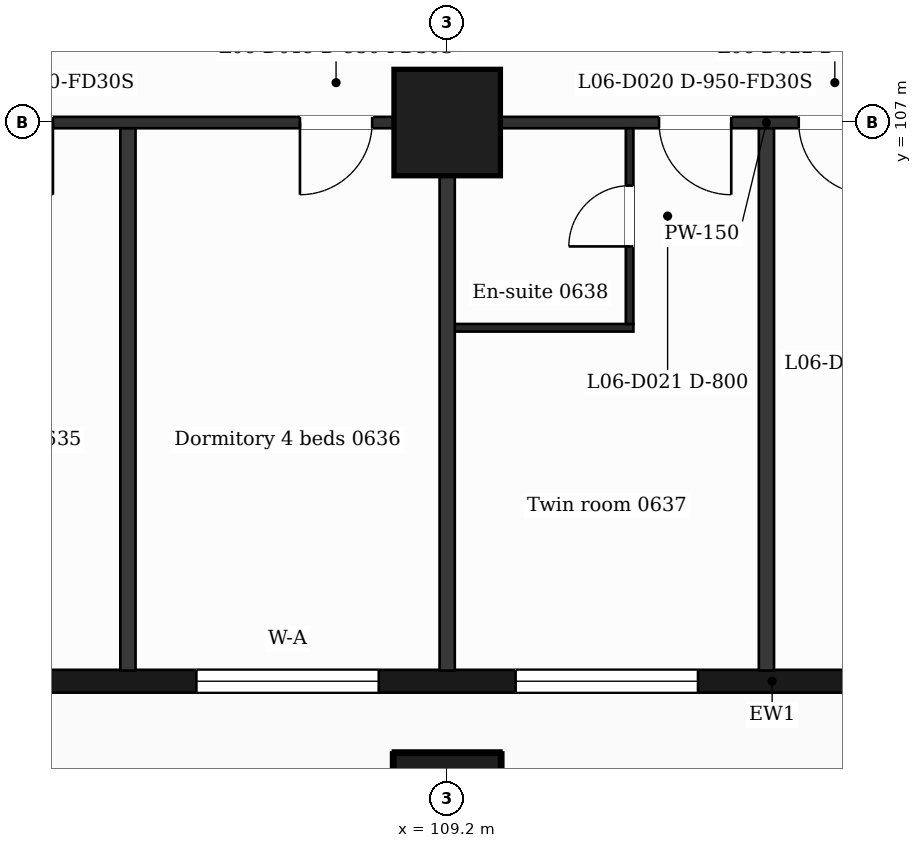
"""IFC4 building model, lengths in metres.
Left out: names, types, materials, properties, quantities, classifications, styles, units other than length and angle.
Written with IfcOpenShell. Run it as: python <this file> out.ifc"""

import sys

from ifc_helpers import new_model, si_unit, direction, frame, frame_2d, origin, origin_2d, place, context, subcontext, project, spatial, rectangle, extrude, element, fill, save


model = new_model("IFC4")
c1 = context("Model", 3, precision=1e-05, world=origin(), true_north=direction((0.0, 1.0)))
c2 = subcontext(c1, "Body", "Model", "MODEL_VIEW")
j1 = project(units=[si_unit("LENGTHUNIT", "METRE"), si_unit("PLANEANGLEUNIT", "RADIAN")], contexts=[c1])
p1 = place(None, origin())
s1 = spatial("IfcSite", under=j1, at=p1, CompositionType="ELEMENT")
p2 = place(p1, origin())
s2 = spatial("IfcBuilding", under=s1, at=p2, CompositionType="ELEMENT")
p3 = place(p2, frame((0.0, 0.0, 39.0)))
s3 = spatial("IfcBuildingStorey", under=s2, at=p3, CompositionType="ELEMENT", Elevation=39.0)
for number, where, z_axis, x_axis in (
    (1, (109.2, 98.0, -0.32), (0.0, 0.0, 1.0), (1.0, 0.0, 0.0)),
    (2, (109.2, 107.0, -0.32), (0.0, 0.0, 1.0), (1.0, 0.0, 0.0)),
):
    element("IfcColumn", number, at=place(p3, frame(where, z_axis=z_axis, x_axis=x_axis)), inside=s3, PredefinedType="COLUMN", context=c2, shape_type="SweptSolid", body=[
        extrude(rectangle(XDim=1.4, YDim=1.4, at=origin_2d()), origin(), (0.0, 0.0, 1.0), 3.82),
    ])
p4 = place(p3, frame((89.85, 99.65, 0.0), z_axis=(0.0, 0.0, 1.0), x_axis=(1.0, 0.0, 0.0)))
e3 = element("IfcWall", 3, at=p4, inside=s3, PredefinedType="SOLIDWALL", context=c2, shape_type="SweptSolid", body=[
    extrude(rectangle(XDim=47.25, YDim=0.3, at=frame_2d((23.625, 0.0))), origin(), (0.0, 0.0, 1.0), 3.18),
])
p5 = place(p4, frame((0.725, 0.0, 0.9)))
e4 = element("IfcOpeningElement", 4, at=p5, cuts=e3, PredefinedType="OPENING", context=c2, shape_type="SweptSolid", body=[
    extrude(rectangle(XDim=1.2, YDim=2.1, at=frame_2d((0.6, 1.05))), frame((0.0, 0.16, 0.0), z_axis=(0.0, -1.0, 0.0), x_axis=(1.0, 0.0, 0.0)), (0.0, 0.0, 1.0), 0.32),
])
p6 = place(p4, frame((3.45, 0.0, 0.9)))
e5 = element("IfcOpeningElement", 5, at=p6, cuts=e3, PredefinedType="OPENING", context=c2, shape_type="SweptSolid", body=[
    extrude(rectangle(XDim=2.4, YDim=2.1, at=frame_2d((1.2, 1.05))), frame((0.0, 0.16, 0.0), z_axis=(0.0, -1.0, 0.0), x_axis=(1.0, 0.0, 0.0)), (0.0, 0.0, 1.0), 0.32),
])
p7 = place(p4, frame((8.25, 0.0, 0.9)))
e6 = element("IfcOpeningElement", 6, at=p7, cuts=e3, PredefinedType="OPENING", context=c2, shape_type="SweptSolid", body=[
    extrude(rectangle(XDim=1.2, YDim=2.1, at=frame_2d((0.6, 1.05))), frame((0.0, 0.16, 0.0), z_axis=(0.0, -1.0, 0.0), x_axis=(1.0, 0.0, 0.0)), (0.0, 0.0, 1.0), 0.32),
])
p8 = place(p4, frame((12.45, 0.0, 0.9)))
e7 = element("IfcOpeningElement", 7, at=p8, cuts=e3, PredefinedType="OPENING", context=c2, shape_type="SweptSolid", body=[
    extrude(rectangle(XDim=1.2, YDim=2.1, at=frame_2d((0.6, 1.05))), frame((0.0, 0.16, 0.0), z_axis=(0.0, -1.0, 0.0), x_axis=(1.0, 0.0, 0.0)), (0.0, 0.0, 1.0), 0.32),
])
p9 = place(p4, frame((16.05, 0.0, 0.9)))
e8 = element("IfcOpeningElement", 8, at=p9, cuts=e3, PredefinedType="OPENING", context=c2, shape_type="SweptSolid", body=[
    extrude(rectangle(XDim=2.4, YDim=2.1, at=frame_2d((1.2, 1.05))), frame((0.0, 0.16, 0.0), z_axis=(0.0, -1.0, 0.0), x_axis=(1.0, 0.0, 0.0)), (0.0, 0.0, 1.0), 0.32),
])
p10 = place(p4, frame((20.25, 0.0, 0.9)))
e9 = element("IfcOpeningElement", 9, at=p10, cuts=e3, PredefinedType="OPENING", context=c2, shape_type="SweptSolid", body=[
    extrude(rectangle(XDim=2.4, YDim=2.1, at=frame_2d((1.2, 1.05))), frame((0.0, 0.16, 0.0), z_axis=(0.0, -1.0, 0.0), x_axis=(1.0, 0.0, 0.0)), (0.0, 0.0, 1.0), 0.32),
])
p11 = place(p4, frame((25.05, 0.0, 0.0)))
e10 = element("IfcOpeningElement", 10, at=p11, cuts=e3, PredefinedType="OPENING", context=c2, shape_type="SweptSolid", body=[
    extrude(rectangle(XDim=1.2, YDim=2.4, at=frame_2d((0.6, 1.2))), frame((0.0, 0.16, 0.0), z_axis=(0.0, -1.0, 0.0), x_axis=(1.0, 0.0, 0.0)), (0.0, 0.0, 1.0), 0.32),
])
p12 = place(p4, frame((28.65, 0.0, 0.9)))
e11 = element("IfcOpeningElement", 11, at=p12, cuts=e3, PredefinedType="OPENING", context=c2, shape_type="SweptSolid", body=[
    extrude(rectangle(XDim=2.4, YDim=2.1, at=frame_2d((1.2, 1.05))), frame((0.0, 0.16, 0.0), z_axis=(0.0, -1.0, 0.0), x_axis=(1.0, 0.0, 0.0)), (0.0, 0.0, 1.0), 0.32),
])
p13 = place(p4, frame((32.85, 0.0, 0.9)))
e12 = element("IfcOpeningElement", 12, at=p13, cuts=e3, PredefinedType="OPENING", context=c2, shape_type="SweptSolid", body=[
    extrude(rectangle(XDim=2.4, YDim=2.1, at=frame_2d((1.2, 1.05))), frame((0.0, 0.16, 0.0), z_axis=(0.0, -1.0, 0.0), x_axis=(1.0, 0.0, 0.0)), (0.0, 0.0, 1.0), 0.32),
])
p14 = place(p4, frame((37.65, 0.0, 0.9)))
e13 = element("IfcOpeningElement", 13, at=p14, cuts=e3, PredefinedType="OPENING", context=c2, shape_type="SweptSolid", body=[
    extrude(rectangle(XDim=1.2, YDim=2.1, at=frame_2d((0.6, 1.05))), frame((0.0, 0.16, 0.0), z_axis=(0.0, -1.0, 0.0), x_axis=(1.0, 0.0, 0.0)), (0.0, 0.0, 1.0), 0.32),
])
p15 = place(p4, frame((41.85, 0.0, 0.9)))
e14 = element("IfcOpeningElement", 14, at=p15, cuts=e3, PredefinedType="OPENING", context=c2, shape_type="SweptSolid", body=[
    extrude(rectangle(XDim=1.2, YDim=2.1, at=frame_2d((0.6, 1.05))), frame((0.0, 0.16, 0.0), z_axis=(0.0, -1.0, 0.0), x_axis=(1.0, 0.0, 0.0)), (0.0, 0.0, 1.0), 0.32),
])
p16 = place(p4, frame((45.25, 0.0, 0.9)))
e15 = element("IfcOpeningElement", 15, at=p16, cuts=e3, PredefinedType="OPENING", context=c2, shape_type="SweptSolid", body=[
    extrude(rectangle(XDim=1.2, YDim=2.1, at=frame_2d((0.6, 1.05))), frame((0.0, 0.16, 0.0), z_axis=(0.0, -1.0, 0.0), x_axis=(1.0, 0.0, 0.0)), (0.0, 0.0, 1.0), 0.32),
])
p17 = place(p3, frame((109.2, 104.3, 0.0), z_axis=(0.0, 0.0, 1.0), x_axis=(1.0, 0.0, 0.0)))
e16 = element("IfcWall", 16, at=p17, inside=s3, PredefinedType="PARTITIONING", context=c2, shape_type="SweptSolid", body=[
    extrude(rectangle(XDim=2.45, YDim=0.1, at=frame_2d((1.225, 0.0))), origin(), (0.0, 0.0, 1.0), 3.18),
])
p18 = place(p3, frame((87.018, 107.0, 0.0), z_axis=(0.0, 0.0, 1.0), x_axis=(1.0, 0.0, 0.0)))
e17 = element("IfcWall", 17, at=p18, inside=s3, PredefinedType="PARTITIONING", context=c2, shape_type="SweptSolid", body=[
    extrude(rectangle(XDim=52.765, YDim=0.15, at=frame_2d((26.382, 0.0))), origin(), (0.0, 0.0, 1.0), 3.18),
])
p19 = place(p18, frame((1.032, 0.0, 0.0)))
e18 = element("IfcOpeningElement", 18, at=p19, cuts=e17, PredefinedType="OPENING", context=c2, shape_type="SweptSolid", body=[
    extrude(rectangle(XDim=0.95, YDim=2.1, at=frame_2d((0.475, 1.05))), frame((0.0, 0.085, 0.0), z_axis=(0.0, -1.0, 0.0), x_axis=(1.0, 0.0, 0.0)), (0.0, 0.0, 1.0), 0.17),
])
p20 = place(p18, frame((6.369, 0.0, 0.0)))
e19 = element("IfcOpeningElement", 19, at=p20, cuts=e17, PredefinedType="OPENING", context=c2, shape_type="SweptSolid", body=[
    extrude(rectangle(XDim=0.95, YDim=2.1, at=frame_2d((0.475, 1.05))), frame((0.0, 0.085, 0.0), z_axis=(0.0, -1.0, 0.0), x_axis=(1.0, 0.0, 0.0)), (0.0, 0.0, 1.0), 0.17),
])
p21 = place(p18, frame((10.952, 0.0, 0.0)))
e20 = element("IfcOpeningElement", 20, at=p21, cuts=e17, PredefinedType="OPENING", context=c2, shape_type="SweptSolid", body=[
    extrude(rectangle(XDim=0.95, YDim=2.1, at=frame_2d((0.475, 1.05))), frame((0.0, 0.085, 0.0), z_axis=(0.0, -1.0, 0.0), x_axis=(1.0, 0.0, 0.0)), (0.0, 0.0, 1.0), 0.17),
])
p22 = place(p18, frame((16.045, 0.0, 0.0)))
e21 = element("IfcOpeningElement", 21, at=p22, cuts=e17, PredefinedType="OPENING", context=c2, shape_type="SweptSolid", body=[
    extrude(rectangle(XDim=0.95, YDim=2.1, at=frame_2d((0.475, 1.05))), frame((0.0, 0.085, 0.0), z_axis=(0.0, -1.0, 0.0), x_axis=(1.0, 0.0, 0.0)), (0.0, 0.0, 1.0), 0.17),
])
p23 = place(p18, frame((20.245, 0.0, 0.0)))
e22 = element("IfcOpeningElement", 22, at=p23, cuts=e17, PredefinedType="OPENING", context=c2, shape_type="SweptSolid", body=[
    extrude(rectangle(XDim=0.95, YDim=2.1, at=frame_2d((0.475, 1.05))), frame((0.0, 0.085, 0.0), z_axis=(0.0, -1.0, 0.0), x_axis=(1.0, 0.0, 0.0)), (0.0, 0.0, 1.0), 0.17),
])
p24 = place(p18, frame((24.969, 0.0, 0.0)))
e23 = element("IfcOpeningElement", 23, at=p24, cuts=e17, PredefinedType="OPENING", context=c2, shape_type="SweptSolid", body=[
    extrude(rectangle(XDim=0.95, YDim=2.1, at=frame_2d((0.475, 1.05))), frame((0.0, 0.085, 0.0), z_axis=(0.0, -1.0, 0.0), x_axis=(1.0, 0.0, 0.0)), (0.0, 0.0, 1.0), 0.17),
])
p25 = place(p18, frame((26.807, 0.0, 0.0)))
e24 = element("IfcOpeningElement", 24, at=p25, cuts=e17, PredefinedType="OPENING", context=c2, shape_type="SweptSolid", body=[
    extrude(rectangle(XDim=0.95, YDim=2.1, at=frame_2d((0.475, 1.05))), frame((0.0, 0.085, 0.0), z_axis=(0.0, -1.0, 0.0), x_axis=(1.0, 0.0, 0.0)), (0.0, 0.0, 1.0), 0.17),
])
p26 = place(p18, frame((31.952, 0.0, 0.0)))
e25 = element("IfcOpeningElement", 25, at=p26, cuts=e17, PredefinedType="OPENING", context=c2, shape_type="SweptSolid", body=[
    extrude(rectangle(XDim=0.95, YDim=2.1, at=frame_2d((0.475, 1.05))), frame((0.0, 0.085, 0.0), z_axis=(0.0, -1.0, 0.0), x_axis=(1.0, 0.0, 0.0)), (0.0, 0.0, 1.0), 0.17),
])
p27 = place(p18, frame((40.795, 0.0, 0.0)))
e26 = element("IfcOpeningElement", 26, at=p27, cuts=e17, PredefinedType="OPENING", context=c2, shape_type="SweptSolid", body=[
    extrude(rectangle(XDim=0.95, YDim=2.1, at=frame_2d((0.475, 1.05))), frame((0.0, 0.085, 0.0), z_axis=(0.0, -1.0, 0.0), x_axis=(1.0, 0.0, 0.0)), (0.0, 0.0, 1.0), 0.17),
])
p28 = place(p18, frame((43.644, 0.0, 0.0)))
e27 = element("IfcOpeningElement", 27, at=p28, cuts=e17, PredefinedType="OPENING", context=c2, shape_type="SweptSolid", body=[
    extrude(rectangle(XDim=0.95, YDim=2.1, at=frame_2d((0.475, 1.05))), frame((0.0, 0.085, 0.0), z_axis=(0.0, -1.0, 0.0), x_axis=(1.0, 0.0, 0.0)), (0.0, 0.0, 1.0), 0.17),
])
p29 = place(p18, frame((48.767, 0.0, 0.0)))
e28 = element("IfcOpeningElement", 28, at=p29, cuts=e17, PredefinedType="OPENING", context=c2, shape_type="SweptSolid", body=[
    extrude(rectangle(XDim=0.95, YDim=2.1, at=frame_2d((0.475, 1.05))), frame((0.0, 0.085, 0.0), z_axis=(0.0, -1.0, 0.0), x_axis=(1.0, 0.0, 0.0)), (0.0, 0.0, 1.0), 0.17),
])
for number, where, z_axis, x_axis in (
    (29, (105.0, 99.79, 0.0), (0.0, 0.0, 1.0), (0.0, 1.0, 0.0)),
    (30, (109.2, 99.79, 0.0), (0.0, 0.0, 1.0), (0.0, 1.0, 0.0)),
):
    element("IfcWall", number, at=place(p3, frame(where, z_axis=z_axis, x_axis=x_axis)), inside=s3, PredefinedType="PARTITIONING", context=c2, shape_type="SweptSolid", body=[
        extrude(rectangle(XDim=7.135, YDim=0.2, at=frame_2d((3.567, 0.0))), origin(), (0.0, 0.0, 1.0), 3.18),
    ])
p30 = place(p3, frame((111.6, 104.35, 0.0), z_axis=(0.0, 0.0, 1.0), x_axis=(0.0, 1.0, 0.0)))
e31 = element("IfcWall", 31, at=p30, inside=s3, PredefinedType="PARTITIONING", context=c2, shape_type="SweptSolid", body=[
    extrude(rectangle(XDim=2.575, YDim=0.1, at=frame_2d((1.288, 0.0))), origin(), (0.0, 0.0, 1.0), 3.18),
])
p31 = place(p30, frame((1.02, 0.0, 0.0)))
e32 = element("IfcOpeningElement", 32, at=p31, cuts=e31, PredefinedType="OPENING", context=c2, shape_type="SweptSolid", body=[
    extrude(rectangle(XDim=0.8, YDim=2.1, at=frame_2d((0.4, 1.05))), frame((0.0, 0.06, 0.0), z_axis=(0.0, -1.0, 0.0), x_axis=(1.0, 0.0, 0.0)), (0.0, 0.0, 1.0), 0.12),
])
p32 = place(p3, frame((113.4, 99.79, 0.0), z_axis=(0.0, 0.0, 1.0), x_axis=(0.0, 1.0, 0.0)))
e33 = element("IfcWall", 33, at=p32, inside=s3, PredefinedType="PARTITIONING", context=c2, shape_type="SweptSolid", body=[
    extrude(rectangle(XDim=7.135, YDim=0.2, at=frame_2d((3.567, 0.0))), origin(), (0.0, 0.0, 1.0), 3.18),
])
p33 = place(p9, origin())
e34 = element("IfcWindow", 34, at=p33, inside=s3, PartitioningType="SINGLE_PANEL", PredefinedType="WINDOW", context=c2, shape_type="SweptSolid", body=[
    extrude(rectangle(XDim=2.4, YDim=2.1, at=frame_2d((1.2, 1.05))), frame((0.0, 0.03, 0.0), z_axis=(0.0, -1.0, 0.0), x_axis=(1.0, 0.0, 0.0)), (0.0, 0.0, 1.0), 0.06),
])
fill(e8, e34)
p34 = place(p10, origin())
e35 = element("IfcWindow", 35, at=p34, inside=s3, PartitioningType="SINGLE_PANEL", PredefinedType="WINDOW", context=c2, shape_type="SweptSolid", body=[
    extrude(rectangle(XDim=2.4, YDim=2.1, at=frame_2d((1.2, 1.05))), frame((0.0, 0.03, 0.0), z_axis=(0.0, -1.0, 0.0), x_axis=(1.0, 0.0, 0.0)), (0.0, 0.0, 1.0), 0.06),
])
fill(e9, e35)
p35 = place(p22, origin())
e36 = element("IfcDoor", 36, at=p35, inside=s3, OperationType="SINGLE_SWING_RIGHT", PredefinedType="DOOR", context=c2, shape_type="SweptSolid", body=[
    extrude(rectangle(XDim=0.95, YDim=2.1, at=frame_2d((0.475, 1.05))), frame((0.0, 0.025, 0.0), z_axis=(0.0, -1.0, 0.0), x_axis=(1.0, 0.0, 0.0)), (0.0, 0.0, 1.0), 0.05),
])
fill(e21, e36)
p36 = place(p23, origin())
e37 = element("IfcDoor", 37, at=p36, inside=s3, OperationType="SINGLE_SWING_LEFT", PredefinedType="DOOR", context=c2, shape_type="SweptSolid", body=[
    extrude(rectangle(XDim=0.95, YDim=2.1, at=frame_2d((0.475, 1.05))), frame((0.0, 0.025, 0.0), z_axis=(0.0, -1.0, 0.0), x_axis=(1.0, 0.0, 0.0)), (0.0, 0.0, 1.0), 0.05),
])
fill(e22, e37)
p37 = place(p24, origin())
e38 = element("IfcDoor", 38, at=p37, inside=s3, OperationType="SINGLE_SWING_RIGHT", PredefinedType="DOOR", context=c2, shape_type="SweptSolid", body=[
    extrude(rectangle(XDim=0.95, YDim=2.1, at=frame_2d((0.475, 1.05))), frame((0.0, 0.025, 0.0), z_axis=(0.0, -1.0, 0.0), x_axis=(1.0, 0.0, 0.0)), (0.0, 0.0, 1.0), 0.05),
])
fill(e23, e38)
p38 = place(p31, origin())
e39 = element("IfcDoor", 39, at=p38, inside=s3, OperationType="SINGLE_SWING_LEFT", PredefinedType="DOOR", context=c2, shape_type="SweptSolid", body=[
    extrude(rectangle(XDim=0.8, YDim=2.1, at=frame_2d((0.4, 1.05))), frame((0.0, 0.025, 0.0), z_axis=(0.0, -1.0, 0.0), x_axis=(1.0, 0.0, 0.0)), (0.0, 0.0, 1.0), 0.05),
])
fill(e32, e39)
p39 = place(p25, origin())
e40 = element("IfcDoor", 40, at=p39, inside=s3, OperationType="SINGLE_SWING_RIGHT", PredefinedType="DOOR", context=c2, shape_type="SweptSolid", body=[
    extrude(rectangle(XDim=0.95, YDim=2.1, at=frame_2d((0.475, 1.05))), frame((0.0, 0.025, 0.0), z_axis=(0.0, -1.0, 0.0), x_axis=(1.0, 0.0, 0.0)), (0.0, 0.0, 1.0), 0.05),
])
fill(e24, e40)
save(model, sys.argv[1])
